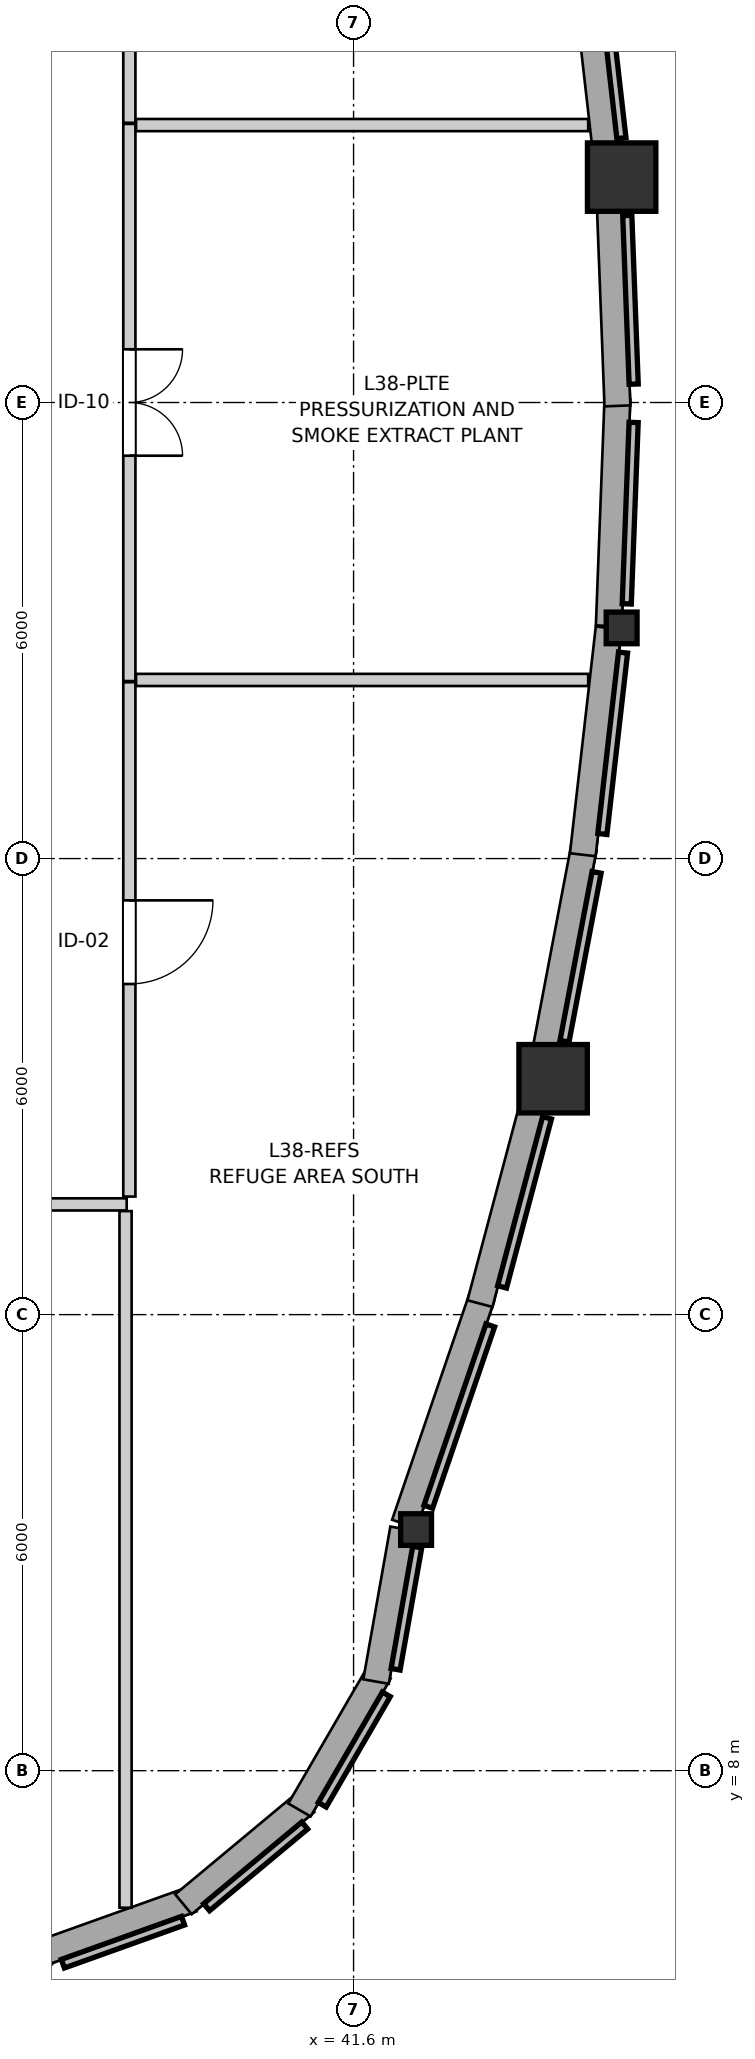
"""IFC4 building model, lengths in metres.
Left out: names, types, materials, properties, quantities, classifications, styles, units other than length and angle.
Written with IfcOpenShell. Run it as: python <this file> out.ifc"""

import sys

from ifc_helpers import new_model, si_unit, direction, frame, frame_2d, origin, origin_2d, place, context, subcontext, project, spatial, rectangle, i_section, extrude, source, transform, mapped, element, fill, save


model = new_model("IFC4")
c1 = context("Model", 3, precision=1e-05, world=origin(), true_north=direction((0.0, 1.0)))
c2 = subcontext(c1, "Body", "Model", "MODEL_VIEW")
j1 = project(units=[si_unit("LENGTHUNIT", "METRE"), si_unit("PLANEANGLEUNIT", "RADIAN")], contexts=[c1])
p1 = place(None, origin())
s1 = spatial("IfcSite", under=j1, at=p1, CompositionType="ELEMENT")
p2 = place(p1, origin())
s2 = spatial("IfcBuilding", under=s1, at=p2, CompositionType="ELEMENT")
p3 = place(p2, frame((0.0, 0.0, 128.0)))
s3 = spatial("IfcBuildingStorey", under=s2, at=p3, CompositionType="ELEMENT", Elevation=128.0)
m1 = source(origin(), c2, "Body", "SweptSolid", [
    extrude(i_section(OverallWidth=0.406, OverallDepth=0.416, WebThickness=0.027, FlangeThickness=0.044, FilletRadius=0.015, at=origin_2d()), origin(), (0.0, 0.0, 1.0), 4.75),
])
p4 = place(p3, frame((42.423, 11.172, 0.0), z_axis=(0.0, 0.0, 1.0), x_axis=(1.0, 0.0, 0.0)))
e1 = element("IfcColumn", 1, at=p4, inside=s3, PredefinedType="PILASTER", context=c2, shape_type="MappedRepresentation", body=[
    mapped(m1, transform((0.0, 0.0, 0.0), x_axis=(1.0, 0.0, 0.0), y_axis=(0.0, 1.0, 0.0), z_axis=(0.0, 0.0, 1.0), scale=1.0)),
])
m2 = source(origin(), c2, "Body", "SweptSolid", [
    extrude(rectangle(XDim=0.9, YDim=0.9, at=origin_2d()), origin(), (0.0, 0.0, 1.0), 4.75),
])
p5 = place(p3, frame((44.226, 17.104, 0.0), z_axis=(0.0, 0.0, 1.0), x_axis=(1.0, 0.0, 0.0)))
e2 = element("IfcColumn", 2, at=p5, inside=s3, PredefinedType="COLUMN", context=c2, shape_type="MappedRepresentation", body=[
    mapped(m2, transform((0.0, 0.0, 0.0), x_axis=(1.0, 0.0, 0.0), y_axis=(0.0, 1.0, 0.0), z_axis=(0.0, 0.0, 1.0), scale=1.0)),
])
p6 = place(p3, frame((45.127, 23.034, 0.0), z_axis=(0.0, 0.0, 1.0), x_axis=(1.0, 0.0, 0.0)))
e3 = element("IfcColumn", 3, at=p6, inside=s3, PredefinedType="PILASTER", context=c2, shape_type="MappedRepresentation", body=[
    mapped(m1, transform((0.0, 0.0, 0.0), x_axis=(1.0, 0.0, 0.0), y_axis=(0.0, 1.0, 0.0), z_axis=(0.0, 0.0, 1.0), scale=1.0)),
])
p7 = place(p3, frame((45.127, 28.966, 0.0), z_axis=(0.0, 0.0, 1.0), x_axis=(1.0, 0.0, 0.0)))
e4 = element("IfcColumn", 4, at=p7, inside=s3, PredefinedType="COLUMN", context=c2, shape_type="MappedRepresentation", body=[
    mapped(m2, transform((0.0, 0.0, 0.0), x_axis=(1.0, 0.0, 0.0), y_axis=(0.0, 1.0, 0.0), z_axis=(0.0, 0.0, 1.0), scale=1.0)),
])
for number, where, z_axis, x_axis in (
    (5, (37.502, 5.602, 0.0), (0.0, 0.0, 1.0), (0.942, 0.337, 0.0)),
    (6, (39.362, 6.242, 0.0), (0.0, 0.0, 1.0), (0.768, 0.64, 0.0)),
):
    element("IfcWall", number, at=place(p3, frame(where, z_axis=z_axis, x_axis=x_axis)), inside=s3, PredefinedType="SOLIDWALL", context=c2, shape_type="SweptSolid", body=[
        extrude(rectangle(XDim=2.099, YDim=0.34, at=frame_2d((1.05, 0.0))), origin(), (0.0, 0.0, 1.0), 4.28),
    ])
p8 = place(p3, frame((40.888, 7.483, 0.0), z_axis=(0.0, 0.0, 1.0), x_axis=(0.501902596059, 0.864924149315, 0.0)))
e7 = element("IfcWall", 7, at=p8, inside=s3, PredefinedType="SOLIDWALL", context=c2, shape_type="SweptSolid", body=[
    extrude(rectangle(XDim=2.099, YDim=0.34, at=frame_2d((1.049, 0.0))), origin(), (0.0, 0.0, 1.0), 4.28),
])
p9 = place(p3, frame((41.896, 9.173, 0.0), z_axis=(0.0, 0.0, 1.0), x_axis=(0.174399433509, 0.984674990843, 0.0)))
e8 = element("IfcWall", 8, at=p9, inside=s3, PredefinedType="SOLIDWALL", context=c2, shape_type="SweptSolid", body=[
    extrude(rectangle(XDim=2.041, YDim=0.34, at=frame_2d((1.021, 0.0))), origin(), (0.0, 0.0, 1.0), 4.28),
])
p10 = place(p3, frame((42.268, 11.246, 0.0), z_axis=(0.0, 0.0, 1.0), x_axis=(0.323583674973, 0.946199558915, 0.0)))
e9 = element("IfcWall", 9, at=p10, inside=s3, PredefinedType="SOLIDWALL", context=c2, shape_type="SweptSolid", body=[
    extrude(rectangle(XDim=3.152, YDim=0.34, at=frame_2d((1.576, 0.0))), origin(), (0.0, 0.0, 1.0), 4.28),
])
p11 = place(p3, frame((43.263, 14.145, 0.0), z_axis=(0.0, 0.0, 1.0), x_axis=(0.257086792151, 0.96638831807, 0.0)))
e10 = element("IfcWall", 10, at=p11, inside=s3, PredefinedType="SOLIDWALL", context=c2, shape_type="SweptSolid", body=[
    extrude(rectangle(XDim=2.876, YDim=0.34, at=frame_2d((1.438, 0.0))), origin(), (0.0, 0.0, 1.0), 4.28),
])
p12 = place(p3, frame((44.101, 17.361, 0.0), z_axis=(0.0, 0.0, 1.0), x_axis=(0.186739007234, 0.982409559795, 0.0)))
e11 = element("IfcWall", 11, at=p12, inside=s3, PredefinedType="SOLIDWALL", context=c2, shape_type="SweptSolid", body=[
    extrude(rectangle(XDim=2.827, YDim=0.34, at=frame_2d((1.413, 0.0))), origin(), (0.0, 0.0, 1.0), 4.28),
])
p13 = place(p3, frame((44.616, 20.05, 0.0), z_axis=(0.0, 0.0, 1.0), x_axis=(0.113250801133, 0.993566432627, 0.0)))
e12 = element("IfcWall", 12, at=p13, inside=s3, PredefinedType="SOLIDWALL", context=c2, shape_type="SweptSolid", body=[
    extrude(rectangle(XDim=3.003, YDim=0.34, at=frame_2d((1.501, 0.0))), origin(), (0.0, 0.0, 1.0), 4.28),
])
p14 = place(p3, frame((44.958, 23.061, 0.0), z_axis=(0.0, 0.0, 1.0), x_axis=(0.037940097137, 0.999280015326, 0.0)))
e13 = element("IfcWall", 13, at=p14, inside=s3, PredefinedType="SOLIDWALL", context=c2, shape_type="SweptSolid", body=[
    extrude(rectangle(XDim=2.986, YDim=0.34, at=frame_2d((1.493, 0.0))), origin(), (0.0, 0.0, 1.0), 4.28),
])
p15 = place(p3, frame((45.071, 25.956, 0.0), z_axis=(0.0, 0.0, 1.0), x_axis=(-0.037997361734, 0.999277839493, 0.0)))
e14 = element("IfcWall", 14, at=p15, inside=s3, PredefinedType="SOLIDWALL", context=c2, shape_type="SweptSolid", body=[
    extrude(rectangle(XDim=2.776, YDim=0.34, at=frame_2d((1.388, 0.0))), origin(), (0.0, 0.0, 1.0), 4.28),
])
p16 = place(p3, frame((44.932, 29.175, 0.0), z_axis=(0.0, 0.0, 1.0), x_axis=(-0.113290188042, 0.993561942354, 0.0)))
e15 = element("IfcWall", 15, at=p16, inside=s3, PredefinedType="SOLIDWALL", context=c2, shape_type="SweptSolid", body=[
    extrude(rectangle(XDim=2.793, YDim=0.34, at=frame_2d((1.396, 0.0))), origin(), (0.0, 0.0, 1.0), 4.28),
])
p17 = place(p3, frame((38.615, 15.45, 0.0), z_axis=(0.0, 0.0, 1.0), x_axis=(-1.0, 0.0, 0.0)))
e16 = element("IfcWall", 16, at=p17, inside=s3, PredefinedType="PARTITIONING", context=c2, shape_type="SweptSolid", body=[
    extrude(rectangle(XDim=10.53, YDim=0.16, at=frame_2d((5.265, 0.0))), origin(), (0.0, 0.0, 1.0), 4.75),
])
p18 = place(p17, frame((4.565, 0.0, 0.0)))
e17 = element("IfcOpeningElement", 17, at=p18, cuts=e16, PredefinedType="OPENING", context=c2, shape_type="SweptSolid", body=[
    extrude(rectangle(XDim=1.4, YDim=2.15, at=frame_2d((0.7, 1.075))), frame((0.0, 0.09, 0.0), z_axis=(0.0, -1.0, 0.0), x_axis=(1.0, 0.0, 0.0)), (0.0, 0.0, 1.0), 0.18),
])
p19 = place(p3, frame((38.65, 29.665, 0.0), z_axis=(0.0, 0.0, 1.0), x_axis=(0.0, -1.0, 0.0)))
e18 = element("IfcWall", 18, at=p19, inside=s3, PredefinedType="PARTITIONING", context=c2, shape_type="SweptSolid", body=[
    extrude(rectangle(XDim=7.33, YDim=0.16, at=frame_2d((3.665, 0.0))), origin(), (0.0, 0.0, 1.0), 4.75),
])
p20 = place(p19, frame((2.965, 0.0, 0.0)))
e19 = element("IfcOpeningElement", 19, at=p20, cuts=e18, PredefinedType="OPENING", context=c2, shape_type="SweptSolid", body=[
    extrude(rectangle(XDim=1.4, YDim=2.15, at=frame_2d((0.7, 1.075))), frame((0.0, 0.09, 0.0), z_axis=(0.0, -1.0, 0.0), x_axis=(1.0, 0.0, 0.0)), (0.0, 0.0, 1.0), 0.18),
])
p21 = place(p3, frame((38.65, 22.32, 0.0), z_axis=(0.0, 0.0, 1.0), x_axis=(0.0, -1.0, 0.0)))
e20 = element("IfcWall", 20, at=p21, inside=s3, PredefinedType="PARTITIONING", context=c2, shape_type="SweptSolid", body=[
    extrude(rectangle(XDim=6.767, YDim=0.16, at=frame_2d((3.384, 0.0))), origin(), (0.0, 0.0, 1.0), 4.75),
])
p22 = place(p21, frame((2.87, 0.0, 0.0)))
e21 = element("IfcOpeningElement", 21, at=p22, cuts=e20, PredefinedType="OPENING", context=c2, shape_type="SweptSolid", body=[
    extrude(rectangle(XDim=1.1, YDim=2.15, at=frame_2d((0.55, 1.075))), frame((0.0, 0.09, 0.0), z_axis=(0.0, -1.0, 0.0), x_axis=(1.0, 0.0, 0.0)), (0.0, 0.0, 1.0), 0.18),
])
p23 = place(p3, frame((38.65, 36.447, 0.0), z_axis=(0.0, 0.0, 1.0), x_axis=(0.0, -1.0, 0.0)))
e22 = element("IfcWall", 22, at=p23, inside=s3, PredefinedType="PARTITIONING", context=c2, shape_type="SweptSolid", body=[
    extrude(rectangle(XDim=6.767, YDim=0.16, at=frame_2d((3.384, 0.0))), origin(), (0.0, 0.0, 1.0), 4.218),
])
p24 = place(p23, frame((2.797, 0.0, 0.0)))
e23 = element("IfcOpeningElement", 23, at=p24, cuts=e22, PredefinedType="OPENING", context=c2, shape_type="SweptSolid", body=[
    extrude(rectangle(XDim=1.1, YDim=2.15, at=frame_2d((0.55, 1.075))), frame((0.0, 0.09, 0.0), z_axis=(0.0, -1.0, 0.0), x_axis=(1.0, 0.0, 0.0)), (0.0, 0.0, 1.0), 0.18),
])
p25 = place(p3, frame((38.6, 6.197, 0.0), z_axis=(0.0, 0.0, 1.0), x_axis=(0.0, 1.0, 0.0)))
e24 = element("IfcWall", 24, at=p25, inside=s3, PredefinedType="PARTITIONING", context=c2, shape_type="SweptSolid", body=[
    extrude(rectangle(XDim=9.165, YDim=0.16, at=frame_2d((4.583, 0.0))), origin(), (0.0, 0.0, 1.0), 4.75),
])
for number, where, z_axis, x_axis in (
    (25, (38.738, 22.35, 0.0), (0.0, 0.0, 1.0), (1.0, 0.0, 0.0)),
    (26, (38.738, 29.65, 0.0), (0.0, 0.0, 1.0), (1.0, 0.0, 0.0)),
):
    element("IfcWall", number, at=place(p3, frame(where, z_axis=z_axis, x_axis=x_axis)), inside=s3, PredefinedType="PARTITIONING", context=c2, shape_type="SweptSolid", body=[
        extrude(rectangle(XDim=5.949, YDim=0.16, at=frame_2d((2.975, 0.0))), origin(), (0.0, 0.0, 1.0), 4.75),
    ])
m3 = source(origin(), c2, "Body", "SweptSolid", [
    extrude(rectangle(XDim=1.4, YDim=2.15, at=frame_2d((0.7, 1.075))), frame((0.0, 0.025, 0.0), z_axis=(0.0, -1.0, 0.0), x_axis=(1.0, 0.0, 0.0)), (0.0, 0.0, 1.0), 0.05),
])
p26 = place(p20, origin())
e27 = element("IfcDoor", 27, at=p26, inside=s3, OperationType="DOUBLE_DOOR_SINGLE_SWING", PredefinedType="DOOR", context=c2, shape_type="MappedRepresentation", body=[
    mapped(m3, transform((0.0, 0.0, 0.0), x_axis=(1.0, 0.0, 0.0), y_axis=(0.0, 1.0, 0.0), z_axis=(0.0, 0.0, 1.0), scale=1.0)),
])
fill(e19, e27)
m4 = source(origin(), c2, "Body", "SweptSolid", [
    extrude(rectangle(XDim=1.1, YDim=2.15, at=frame_2d((0.55, 1.075))), frame((0.0, 0.025, 0.0), z_axis=(0.0, -1.0, 0.0), x_axis=(1.0, 0.0, 0.0)), (0.0, 0.0, 1.0), 0.05),
])
p27 = place(p22, origin())
e28 = element("IfcDoor", 28, at=p27, inside=s3, OperationType="SINGLE_SWING_LEFT", PredefinedType="DOOR", context=c2, shape_type="MappedRepresentation", body=[
    mapped(m4, transform((0.0, 0.0, 0.0), x_axis=(1.0, 0.0, 0.0), y_axis=(0.0, 1.0, 0.0), z_axis=(0.0, 0.0, 1.0), scale=1.0)),
])
fill(e21, e28)
save(model, sys.argv[1])
